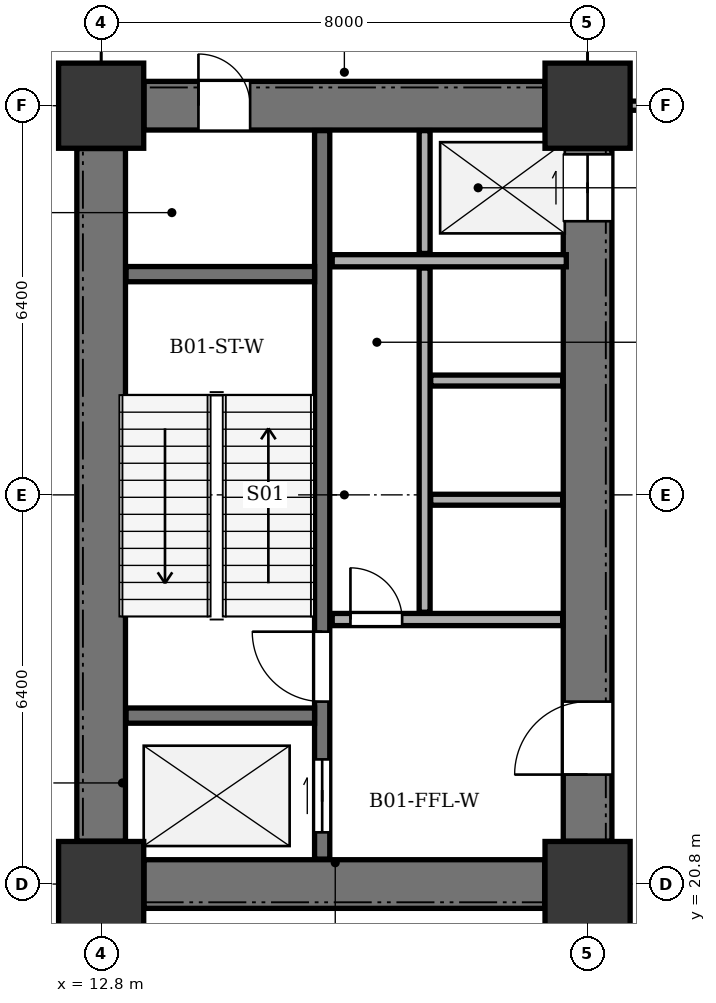
"""IFC4 building model, lengths in metres.
Left out: names, types, materials, properties, quantities, classifications, styles, units other than length and angle.
Written with IfcOpenShell. Run it as: python <this file> out.ifc"""

import sys

from ifc_helpers import new_model, si_unit, direction, frame, frame_2d, origin, origin_2d, place, context, subcontext, project, spatial, rectangle, extrude, element, fill, save


model = new_model("IFC4")
c1 = context("Model", 3, precision=1e-05, world=origin(), true_north=direction((0.0, 1.0)))
c2 = subcontext(c1, "Body", "Model", "MODEL_VIEW")
j1 = project(units=[si_unit("LENGTHUNIT", "METRE"), si_unit("PLANEANGLEUNIT", "RADIAN")], contexts=[c1])
p1 = place(None, origin())
s1 = spatial("IfcSite", under=j1, at=p1, CompositionType="ELEMENT")
p2 = place(p1, origin())
s2 = spatial("IfcBuilding", under=s1, at=p2, CompositionType="ELEMENT")
p3 = place(p2, frame((0.0, 0.0, -4.8)))
s3 = spatial("IfcBuildingStorey", under=s2, at=p3, CompositionType="ELEMENT", Elevation=-4.8)
for number, where, z_axis, x_axis in (
    (1, (12.8, 20.8, 0.0), (0.0, 0.0, 1.0), (1.0, 0.0, 0.0)),
    (2, (20.8, 20.8, 0.0), (0.0, 0.0, 1.0), (1.0, 0.0, 0.0)),
    (3, (12.8, 33.6, 0.0), (0.0, 0.0, 1.0), (1.0, 0.0, 0.0)),
    (4, (20.8, 33.6, 0.0), (0.0, 0.0, 1.0), (1.0, 0.0, 0.0)),
):
    element("IfcColumn", number, at=place(p3, frame(where, z_axis=z_axis, x_axis=x_axis)), inside=s3, PredefinedType="COLUMN", context=c2, shape_type="SweptSolid", body=[
        extrude(rectangle(XDim=1.4, YDim=1.4, at=origin_2d()), origin(), (0.0, 0.0, 1.0), 4.8),
    ])
p4 = place(p3, frame((12.8, 21.505, 0.0), z_axis=(0.0, 0.0, 1.0), x_axis=(0.0, 1.0, 0.0)))
e5 = element("IfcWall", 5, at=p4, inside=s3, PredefinedType="SHEAR", context=c2, shape_type="SweptSolid", body=[
    extrude(rectangle(XDim=11.39, YDim=0.8, at=frame_2d((5.695, 0.0))), origin(), (0.0, 0.0, 1.0), 4.35),
])
p5 = place(p3, frame((13.505, 20.8, 0.0), z_axis=(0.0, 0.0, 1.0), x_axis=(1.0, 0.0, 0.0)))
e6 = element("IfcWall", 6, at=p5, inside=s3, PredefinedType="SHEAR", context=c2, shape_type="SweptSolid", body=[
    extrude(rectangle(XDim=6.59, YDim=0.8, at=frame_2d((3.295, 0.0))), origin(), (0.0, 0.0, 1.0), 4.35),
])
p6 = place(p3, frame((13.505, 33.6, 0.0), z_axis=(0.0, 0.0, 1.0), x_axis=(1.0, 0.0, 0.0)))
e7 = element("IfcWall", 7, at=p6, inside=s3, PredefinedType="SHEAR", context=c2, shape_type="SweptSolid", body=[
    extrude(rectangle(XDim=6.59, YDim=0.8, at=frame_2d((3.295, 0.0))), origin(), (0.0, 0.0, 1.0), 4.35),
])
p7 = place(p6, frame((0.895, 0.0, 0.0)))
e8 = element("IfcOpeningElement", 8, at=p7, cuts=e7, PredefinedType="OPENING", context=c2, shape_type="SweptSolid", body=[
    extrude(rectangle(XDim=0.85, YDim=2.02, at=frame_2d((0.425, 1.01))), frame((0.0, 0.41, 0.0), z_axis=(0.0, -1.0, 0.0), x_axis=(1.0, 0.0, 0.0)), (0.0, 0.0, 1.0), 0.82),
])
p8 = place(p3, frame((20.8, 21.505, 0.0), z_axis=(0.0, 0.0, 1.0), x_axis=(0.0, 1.0, 0.0)))
e9 = element("IfcWall", 9, at=p8, inside=s3, PredefinedType="SHEAR", context=c2, shape_type="SweptSolid", body=[
    extrude(rectangle(XDim=11.39, YDim=0.8, at=frame_2d((5.695, 0.0))), origin(), (0.0, 0.0, 1.0), 4.35),
])
p9 = place(p8, frame((1.095, 0.0, 0.0)))
e10 = element("IfcOpeningElement", 10, at=p9, cuts=e9, PredefinedType="OPENING", context=c2, shape_type="SweptSolid", body=[
    extrude(rectangle(XDim=1.2, YDim=2.15, at=frame_2d((0.6, 1.075))), frame((0.0, 0.41, 0.0), z_axis=(0.0, -1.0, 0.0), x_axis=(1.0, 0.0, 0.0)), (0.0, 0.0, 1.0), 0.82),
])
p10 = place(p8, frame((10.195, 0.0, 0.0)))
e11 = element("IfcOpeningElement", 11, at=p10, cuts=e9, PredefinedType="OPENING", context=c2, shape_type="SweptSolid", body=[
    extrude(rectangle(XDim=1.1, YDim=2.1, at=frame_2d((0.55, 1.05))), frame((0.0, 0.41, 0.0), z_axis=(0.0, -1.0, 0.0), x_axis=(1.0, 0.0, 0.0)), (0.0, 0.0, 1.0), 0.82),
])
p11 = place(p3, frame((16.435, 21.21, 0.0), z_axis=(0.0, 0.0, 1.0), x_axis=(0.0, 1.0, 0.0)))
e12 = element("IfcWall", 12, at=p11, inside=s3, PredefinedType="SHEAR", context=c2, shape_type="SweptSolid", body=[
    extrude(rectangle(XDim=11.98, YDim=0.25, at=frame_2d((5.99, 0.0))), origin(), (0.0, 0.0, 1.0), 4.35),
])
p12 = place(p11, frame((0.44, 0.0, 0.0)))
e13 = element("IfcOpeningElement", 13, at=p12, cuts=e12, PredefinedType="OPENING", context=c2, shape_type="SweptSolid", body=[
    extrude(rectangle(XDim=1.2, YDim=2.15, at=frame_2d((0.6, 1.075))), frame((0.0, 0.135, 0.0), z_axis=(0.0, -1.0, 0.0), x_axis=(1.0, 0.0, 0.0)), (0.0, 0.0, 1.0), 0.27),
])
p13 = place(p11, frame((2.59, 0.0, 0.0)))
e14 = element("IfcOpeningElement", 14, at=p13, cuts=e12, PredefinedType="OPENING", context=c2, shape_type="SweptSolid", body=[
    extrude(rectangle(XDim=1.15, YDim=2.15, at=frame_2d((0.575, 1.075))), frame((0.0, 0.135, 0.0), z_axis=(0.0, -1.0, 0.0), x_axis=(1.0, 0.0, 0.0)), (0.0, 0.0, 1.0), 0.27),
])
for number, where, z_axis, x_axis in (
    (15, (13.21, 23.57, 0.0), (0.0, 0.0, 1.0), (1.0, 0.0, 0.0)),
    (16, (13.21, 30.83, 0.0), (0.0, 0.0, 1.0), (1.0, 0.0, 0.0)),
):
    element("IfcWall", number, at=place(p3, frame(where, z_axis=z_axis, x_axis=x_axis)), inside=s3, PredefinedType="SHEAR", context=c2, shape_type="SweptSolid", body=[
        extrude(rectangle(XDim=3.1, YDim=0.25, at=frame_2d((1.55, 0.0))), origin(), (0.0, 0.0, 1.0), 4.35),
    ])
p14 = place(p3, frame((16.6, 25.15, 0.0), z_axis=(0.0, 0.0, 1.0), x_axis=(1.0, 0.0, 0.0)))
e17 = element("IfcWall", 17, at=p14, inside=s3, PredefinedType="SOLIDWALL", context=c2, shape_type="SweptSolid", body=[
    extrude(rectangle(XDim=3.79, YDim=0.2, at=frame_2d((1.895, 0.0))), origin(), (0.0, 0.0, 1.0), 4.35),
])
p15 = place(p14, frame((0.3, 0.0, 0.0)))
e18 = element("IfcOpeningElement", 18, at=p15, cuts=e17, PredefinedType="OPENING", context=c2, shape_type="SweptSolid", body=[
    extrude(rectangle(XDim=0.85, YDim=2.02, at=frame_2d((0.425, 1.01))), frame((0.0, 0.11, 0.0), z_axis=(0.0, -1.0, 0.0), x_axis=(1.0, 0.0, 0.0)), (0.0, 0.0, 1.0), 0.22),
])
p16 = place(p3, frame((16.6, 31.05, 0.0), z_axis=(0.0, 0.0, 1.0), x_axis=(1.0, 0.0, 0.0)))
e19 = element("IfcWall", 19, at=p16, inside=s3, PredefinedType="SOLIDWALL", context=c2, shape_type="SweptSolid", body=[
    extrude(rectangle(XDim=3.85, YDim=0.2, at=frame_2d((1.925, 0.0))), origin(), (0.0, 0.0, 1.0), 4.35),
])
p17 = place(p3, frame((18.12, 25.27, 0.0), z_axis=(0.0, 0.0, 1.0), x_axis=(0.0, 1.0, 0.0)))
e20 = element("IfcWall", 20, at=p17, inside=s3, PredefinedType="PARTITIONING", context=c2, shape_type="SweptSolid", body=[
    extrude(rectangle(XDim=5.66, YDim=0.18, at=frame_2d((2.83, 0.0))), origin(), (0.0, 0.0, 1.0), 4.35),
])
p18 = place(p3, frame((18.12, 31.17, 0.0), z_axis=(0.0, 0.0, 1.0), x_axis=(0.0, 1.0, 0.0)))
e21 = element("IfcWall", 21, at=p18, inside=s3, PredefinedType="PARTITIONING", context=c2, shape_type="SweptSolid", body=[
    extrude(rectangle(XDim=2.02, YDim=0.18, at=frame_2d((1.01, 0.0))), origin(), (0.0, 0.0, 1.0), 4.35),
])
for number, where, z_axis, x_axis in (
    (22, (18.22, 27.12, 0.0), (0.0, 0.0, 1.0), (1.0, 0.0, 0.0)),
    (23, (18.22, 29.08, 0.0), (0.0, 0.0, 1.0), (1.0, 0.0, 0.0)),
):
    element("IfcWall", number, at=place(p3, frame(where, z_axis=z_axis, x_axis=x_axis)), inside=s3, PredefinedType="PARTITIONING", context=c2, shape_type="SweptSolid", body=[
        extrude(rectangle(XDim=2.17, YDim=0.18, at=frame_2d((1.085, 0.0))), origin(), (0.0, 0.0, 1.0), 4.35),
    ])
p19 = place(p3, frame((21.35, 33.6, 0.0), z_axis=(0.0, 0.0, 1.0), x_axis=(1.0, 0.0, 0.0)))
e24 = element("IfcWall", 24, at=p19, inside=s3, PredefinedType="PARTITIONING", context=c2, shape_type="SweptSolid", body=[
    extrude(rectangle(XDim=13.3, YDim=0.15, at=frame_2d((6.65, 0.0))), origin(), (0.0, 0.0, 1.0), 3.385),
])
p20 = place(p19, frame((5.9, 0.0, 0.0)))
e25 = element("IfcOpeningElement", 25, at=p20, cuts=e24, PredefinedType="OPENING", context=c2, shape_type="SweptSolid", body=[
    extrude(rectangle(XDim=1.4, YDim=2.15, at=frame_2d((0.7, 1.075))), frame((0.0, 0.085, 0.0), z_axis=(0.0, -1.0, 0.0), x_axis=(1.0, 0.0, 0.0)), (0.0, 0.0, 1.0), 0.17),
])
p21 = place(p7, origin())
e26 = element("IfcDoor", 26, at=p21, inside=s3, OperationType="SINGLE_SWING_LEFT", PredefinedType="DOOR", context=c2, shape_type="SweptSolid", body=[
    extrude(rectangle(XDim=0.85, YDim=2.02, at=frame_2d((0.425, 1.01))), frame((0.0, 0.025, 0.0), z_axis=(0.0, -1.0, 0.0), x_axis=(1.0, 0.0, 0.0)), (0.0, 0.0, 1.0), 0.05),
])
fill(e8, e26)
p22 = place(p9, origin())
e27 = element("IfcDoor", 27, at=p22, inside=s3, OperationType="SINGLE_SWING_LEFT", PredefinedType="DOOR", context=c2, shape_type="SweptSolid", body=[
    extrude(rectangle(XDim=1.2, YDim=2.15, at=frame_2d((0.6, 1.075))), frame((0.0, 0.025, 0.0), z_axis=(0.0, -1.0, 0.0), x_axis=(1.0, 0.0, 0.0)), (0.0, 0.0, 1.0), 0.05),
])
fill(e10, e27)
p23 = place(p10, origin())
e28 = element("IfcDoor", 28, at=p23, inside=s3, OperationType="DOUBLE_DOOR_SLIDING", PredefinedType="DOOR", context=c2, shape_type="SweptSolid", body=[
    extrude(rectangle(XDim=1.1, YDim=2.1, at=frame_2d((0.55, 1.05))), frame((0.0, 0.025, 0.0), z_axis=(0.0, -1.0, 0.0), x_axis=(1.0, 0.0, 0.0)), (0.0, 0.0, 1.0), 0.05),
])
fill(e11, e28)
p24 = place(p12, origin())
e29 = element("IfcDoor", 29, at=p24, inside=s3, OperationType="DOUBLE_DOOR_SLIDING", PredefinedType="DOOR", context=c2, shape_type="SweptSolid", body=[
    extrude(rectangle(XDim=1.2, YDim=2.15, at=frame_2d((0.6, 1.075))), frame((0.0, 0.025, 0.0), z_axis=(0.0, -1.0, 0.0), x_axis=(1.0, 0.0, 0.0)), (0.0, 0.0, 1.0), 0.05),
])
fill(e13, e29)
p25 = place(p13, origin())
e30 = element("IfcDoor", 30, at=p25, inside=s3, OperationType="SINGLE_SWING_RIGHT", PredefinedType="DOOR", context=c2, shape_type="SweptSolid", body=[
    extrude(rectangle(XDim=1.15, YDim=2.15, at=frame_2d((0.575, 1.075))), frame((0.0, 0.025, 0.0), z_axis=(0.0, -1.0, 0.0), x_axis=(1.0, 0.0, 0.0)), (0.0, 0.0, 1.0), 0.05),
])
fill(e14, e30)
p26 = place(p15, origin())
e31 = element("IfcDoor", 31, at=p26, inside=s3, OperationType="SINGLE_SWING_LEFT", PredefinedType="DOOR", context=c2, shape_type="SweptSolid", body=[
    extrude(rectangle(XDim=0.85, YDim=2.02, at=frame_2d((0.425, 1.01))), frame((0.0, 0.025, 0.0), z_axis=(0.0, -1.0, 0.0), x_axis=(1.0, 0.0, 0.0)), (0.0, 0.0, 1.0), 0.05),
])
fill(e18, e31)
save(model, sys.argv[1])
